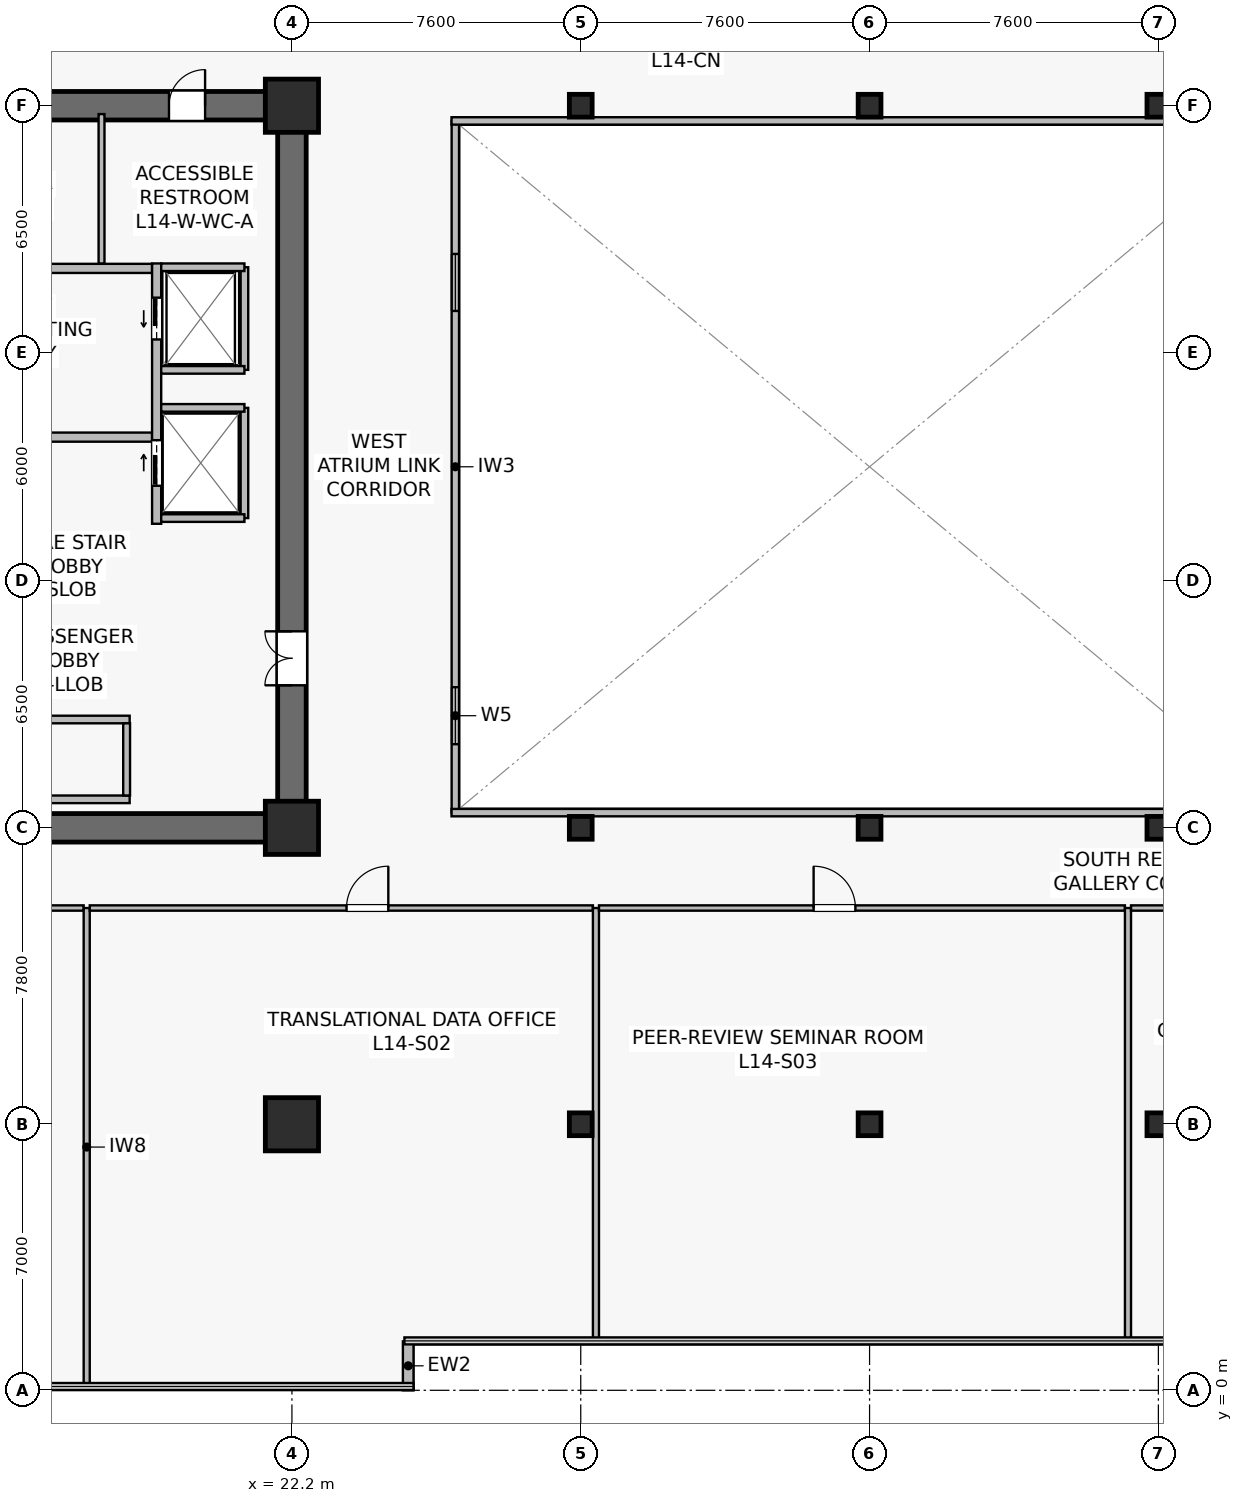
"""IFC4 building model, lengths in metres.
Left out: names, types, materials, properties, quantities, classifications, styles, units other than length and angle.
Written with IfcOpenShell. Run it as: python <this file> out.ifc"""

import sys

from ifc_helpers import new_model, si_unit, direction, frame, frame_2d, origin, origin_2d, place, context, subcontext, project, spatial, rectangle, hollow_rectangle, extrude, source, transform, mapped, element, fill, save


model = new_model("IFC4")
c1 = context("Model", 3, precision=1e-05, world=origin(), true_north=direction((0.0, 1.0)))
c2 = subcontext(c1, "Body", "Model", "MODEL_VIEW")
j1 = project(units=[si_unit("LENGTHUNIT", "METRE"), si_unit("PLANEANGLEUNIT", "RADIAN")], contexts=[c1])
p1 = place(None, origin())
s1 = spatial("IfcSite", under=j1, at=p1, CompositionType="ELEMENT")
p2 = place(p1, origin())
s2 = spatial("IfcBuilding", under=s1, at=p2, CompositionType="ELEMENT")
p3 = place(p2, frame((0.0, 0.0, 58.0)))
s3 = spatial("IfcBuildingStorey", under=s2, at=p3, CompositionType="ELEMENT", Elevation=58.0)
p4 = place(p3, frame((7.025, 14.8, 0.0), z_axis=(0.0, 0.0, 1.0), x_axis=(1.0, 0.0, 0.0)))
e1 = element("IfcWall", 1, at=p4, inside=s3, PredefinedType="SHEAR", context=c2, shape_type="SweptSolid", body=[
    extrude(rectangle(XDim=15.55, YDim=0.75, at=frame_2d((7.775, 0.0))), origin(), (0.0, 0.0, 1.0), 3.78),
])
p5 = place(p3, frame((7.025, 33.8, 0.0), z_axis=(0.0, 0.0, 1.0), x_axis=(1.0, 0.0, 0.0)))
e2 = element("IfcWall", 2, at=p5, inside=s3, PredefinedType="SHEAR", context=c2, shape_type="SweptSolid", body=[
    extrude(rectangle(XDim=15.55, YDim=0.75, at=frame_2d((7.775, 0.0))), origin(), (0.0, 0.0, 1.0), 3.78),
])
p6 = place(p5, frame((6.875, 0.0, 0.0)))
e3 = element("IfcOpeningElement", 3, at=p6, cuts=e2, PredefinedType="OPENING", context=c2, shape_type="SweptSolid", body=[
    extrude(rectangle(XDim=0.95, YDim=2.15, at=frame_2d((0.475, 1.075))), frame((0.0, 0.385, 0.0), z_axis=(0.0, -1.0, 0.0), x_axis=(1.0, 0.0, 0.0)), (0.0, 0.0, 1.0), 0.77),
])
p7 = place(p5, frame((11.94, 0.0, 0.0)))
e4 = element("IfcOpeningElement", 4, at=p7, cuts=e2, PredefinedType="OPENING", context=c2, shape_type="SweptSolid", body=[
    extrude(rectangle(XDim=0.95, YDim=2.15, at=frame_2d((0.475, 1.075))), frame((0.0, 0.385, 0.0), z_axis=(0.0, -1.0, 0.0), x_axis=(1.0, 0.0, 0.0)), (0.0, 0.0, 1.0), 0.77),
])
p8 = place(p3, frame((22.2, 15.175, 0.0), z_axis=(0.0, 0.0, 1.0), x_axis=(0.0, 1.0, 0.0)))
e5 = element("IfcWall", 5, at=p8, inside=s3, PredefinedType="SHEAR", context=c2, shape_type="SweptSolid", body=[
    extrude(rectangle(XDim=18.25, YDim=0.75, at=frame_2d((9.125, 0.0))), origin(), (0.0, 0.0, 1.0), 3.78),
])
p9 = place(p8, frame((3.375, 0.0, 0.0)))
e6 = element("IfcOpeningElement", 6, at=p9, cuts=e5, PredefinedType="OPENING", context=c2, shape_type="SweptSolid", body=[
    extrude(rectangle(XDim=1.42, YDim=2.2, at=frame_2d((0.71, 1.1))), frame((0.0, 0.385, 0.0), z_axis=(0.0, -1.0, 0.0), x_axis=(1.0, 0.0, 0.0)), (0.0, 0.0, 1.0), 0.77),
])
m1 = source(origin(), c2, "Body", "SweptSolid", [
    extrude(rectangle(XDim=1.4, YDim=1.4, at=origin_2d()), origin(), (0.0, 0.0, 1.0), 4.1),
])
for number, where, z_axis, x_axis in (
    (7, (22.2, 7.0, 0.0), (0.0, 0.0, 1.0), (1.0, 0.0, 0.0)),
    (8, (22.2, 14.8, 0.0), (0.0, 0.0, 1.0), (1.0, 0.0, 0.0)),
    (9, (22.2, 33.8, 0.0), (0.0, 0.0, 1.0), (1.0, 0.0, 0.0)),
):
    element("IfcColumn", number, at=place(p3, frame(where, z_axis=z_axis, x_axis=x_axis)), inside=s3, PredefinedType="COLUMN", context=c2, shape_type="MappedRepresentation", body=[
        mapped(m1, transform((0.0, 0.0, 0.0), scale=1.0)),
    ])
m2 = source(origin(), c2, "Body", "SweptSolid", [
    extrude(hollow_rectangle(XDim=0.6, YDim=0.6, WallThickness=0.028, at=origin_2d()), origin(), (0.0, 0.0, 1.0), 4.1),
])
for number, where, z_axis, x_axis in (
    (10, (29.8, 7.0, 0.0), (0.0, 0.0, 1.0), (1.0, 0.0, 0.0)),
    (11, (29.8, 14.8, 0.0), (0.0, 0.0, 1.0), (1.0, 0.0, 0.0)),
    (12, (29.8, 33.8, 0.0), (0.0, 0.0, 1.0), (1.0, 0.0, 0.0)),
    (13, (37.4, 7.0, 0.0), (0.0, 0.0, 1.0), (1.0, 0.0, 0.0)),
    (14, (37.4, 14.8, 0.0), (0.0, 0.0, 1.0), (1.0, 0.0, 0.0)),
    (15, (37.4, 33.8, 0.0), (0.0, 0.0, 1.0), (1.0, 0.0, 0.0)),
    (16, (45.0, 7.0, 0.0), (0.0, 0.0, 1.0), (1.0, 0.0, 0.0)),
    (17, (45.0, 14.8, 0.0), (0.0, 0.0, 1.0), (1.0, 0.0, 0.0)),
    (18, (45.0, 33.8, 0.0), (0.0, 0.0, 1.0), (1.0, 0.0, 0.0)),
):
    element("IfcColumn", number, at=place(p3, frame(where, z_axis=z_axis, x_axis=x_axis)), inside=s3, PredefinedType="COLUMN", context=c2, shape_type="MappedRepresentation", body=[
        mapped(m2, transform((0.0, 0.0, 0.0), scale=1.0)),
    ])
p10 = place(p3, frame((25.26, 0.0, 0.0), z_axis=(0.0, 0.0, 1.0), x_axis=(0.0, 1.0, 0.0)))
e19 = element("IfcWall", 19, at=p10, inside=s3, PredefinedType="STANDARD", context=c2, shape_type="SweptSolid", body=[
    extrude(rectangle(XDim=1.288, YDim=0.28, at=frame_2d((0.644, 0.0))), origin(), (0.0, 0.0, 1.0), 3.78),
])
p11 = place(p3, frame((11.6, 25.08, 0.0), z_axis=(0.0, 0.0, 1.0), x_axis=(1.0, 0.0, 0.0)))
e20 = element("IfcWall", 20, at=p11, inside=s3, PredefinedType="SOLIDWALL", context=c2, shape_type="SweptSolid", body=[
    extrude(rectangle(XDim=6.92, YDim=0.24, at=frame_2d((3.46, 0.0))), origin(), (0.0, 0.0, 1.0), 3.065),
])
p12 = place(p11, frame((2.6, 0.0, 0.0)))
e21 = element("IfcOpeningElement", 21, at=p12, cuts=e20, PredefinedType="OPENING", context=c2, shape_type="SweptSolid", body=[
    extrude(rectangle(XDim=1.2, YDim=2.16, at=frame_2d((0.6, 1.08))), frame((0.0, 0.13, 0.0), z_axis=(0.0, -1.0, 0.0), x_axis=(1.0, 0.0, 0.0)), (0.0, 0.0, 1.0), 0.26),
])
p13 = place(p3, frame((11.6, 29.52, 0.0), z_axis=(0.0, 0.0, 1.0), x_axis=(1.0, 0.0, 0.0)))
e22 = element("IfcWall", 22, at=p13, inside=s3, PredefinedType="SOLIDWALL", context=c2, shape_type="SweptSolid", body=[
    extrude(rectangle(XDim=6.92, YDim=0.24, at=frame_2d((3.46, 0.0))), origin(), (0.0, 0.0, 1.0), 3.065),
])
p14 = place(p3, frame((18.64, 22.8, 0.0), z_axis=(0.0, 0.0, 1.0), x_axis=(0.0, 1.0, 0.0)))
e23 = element("IfcWall", 23, at=p14, inside=s3, PredefinedType="SOLIDWALL", context=c2, shape_type="SweptSolid", body=[
    extrude(rectangle(XDim=6.85, YDim=0.24, at=frame_2d((3.425, 0.0))), origin(), (0.0, 0.0, 1.0), 2.865),
])
p15 = place(p14, frame((4.85, 0.0, 0.0)))
e24 = element("IfcOpeningElement", 24, at=p15, cuts=e23, PredefinedType="OPENING", context=c2, shape_type="SweptSolid", body=[
    extrude(rectangle(XDim=1.1, YDim=2.22, at=frame_2d((0.55, 1.11))), frame((0.0, 0.13, 0.0), z_axis=(0.0, -1.0, 0.0), x_axis=(1.0, 0.0, 0.0)), (0.0, 0.0, 1.0), 0.26),
])
p16 = place(p14, frame((1.0, 0.0, 0.0)))
e25 = element("IfcOpeningElement", 25, at=p16, cuts=e23, PredefinedType="OPENING", context=c2, shape_type="SweptSolid", body=[
    extrude(rectangle(XDim=1.2, YDim=2.22, at=frame_2d((0.6, 1.11))), frame((0.0, 0.13, 0.0), z_axis=(0.0, -1.0, 0.0), x_axis=(1.0, 0.0, 0.0)), (0.0, 0.0, 1.0), 0.26),
])
for number, where, z_axis, x_axis in (
    (26, (15.67, 17.65, 0.0), (0.0, 0.0, 1.0), (1.0, 0.0, 0.0)),
    (27, (15.67, 15.55, 0.0), (0.0, 0.0, 1.0), (1.0, 0.0, 0.0)),
):
    element("IfcWall", number, at=place(p3, frame(where, z_axis=z_axis, x_axis=x_axis)), inside=s3, PredefinedType="SOLIDWALL", context=c2, shape_type="SweptSolid", body=[
        extrude(rectangle(XDim=2.26, YDim=0.2, at=frame_2d((1.13, 0.0))), origin(), (0.0, 0.0, 1.0), 3.78),
    ])
p17 = place(p3, frame((17.85, 15.65, 0.0), z_axis=(0.0, 0.0, 1.0), x_axis=(0.0, 1.0, 0.0)))
e28 = element("IfcWall", 28, at=p17, inside=s3, PredefinedType="SOLIDWALL", context=c2, shape_type="SweptSolid", body=[
    extrude(rectangle(XDim=1.9, YDim=0.18, at=frame_2d((0.95, 0.0))), origin(), (0.0, 0.0, 1.0), 3.78),
])
p18 = place(p3, frame((20.95, 26.85, 0.0), z_axis=(0.0, 0.0, 1.0), x_axis=(0.0, 1.0, 0.0)))
e29 = element("IfcWall", 29, at=p18, inside=s3, PredefinedType="SOLIDWALL", context=c2, shape_type="SweptSolid", body=[
    extrude(rectangle(XDim=2.7, YDim=0.2, at=frame_2d((1.35, 0.0))), origin(), (0.0, 0.0, 1.0), 3.78),
])
p19 = place(p3, frame((18.76, 29.55, 0.0), z_axis=(0.0, 0.0, 1.0), x_axis=(1.0, 0.0, 0.0)))
e30 = element("IfcWall", 30, at=p19, inside=s3, PredefinedType="SOLIDWALL", context=c2, shape_type="SweptSolid", body=[
    extrude(rectangle(XDim=2.19, YDim=0.2, at=frame_2d((1.095, 0.0))), origin(), (0.0, 0.0, 1.0), 3.78),
])
p20 = place(p3, frame((18.76, 26.85, 0.0), z_axis=(0.0, 0.0, 1.0), x_axis=(1.0, 0.0, 0.0)))
e31 = element("IfcWall", 31, at=p20, inside=s3, PredefinedType="SOLIDWALL", context=c2, shape_type="SweptSolid", body=[
    extrude(rectangle(XDim=2.19, YDim=0.2, at=frame_2d((1.095, 0.0))), origin(), (0.0, 0.0, 1.0), 3.177),
])
p21 = place(p3, frame((20.95, 22.95, 0.0), z_axis=(0.0, 0.0, 1.0), x_axis=(0.0, 1.0, 0.0)))
e32 = element("IfcWall", 32, at=p21, inside=s3, PredefinedType="SOLIDWALL", context=c2, shape_type="SweptSolid", body=[
    extrude(rectangle(XDim=2.9, YDim=0.2, at=frame_2d((1.45, 0.0))), origin(), (0.0, 0.0, 1.0), 2.865),
])
for number, where, z_axis, x_axis in (
    (33, (18.76, 25.85, 0.0), (0.0, 0.0, 1.0), (1.0, 0.0, 0.0)),
    (34, (18.76, 22.95, 0.0), (0.0, 0.0, 1.0), (1.0, 0.0, 0.0)),
):
    element("IfcWall", number, at=place(p3, frame(where, z_axis=z_axis, x_axis=x_axis)), inside=s3, PredefinedType="SOLIDWALL", context=c2, shape_type="SweptSolid", body=[
        extrude(rectangle(XDim=2.19, YDim=0.2, at=frame_2d((1.095, 0.0))), origin(), (0.0, 0.0, 1.0), 3.78),
    ])
p22 = place(p3, frame((17.19, 29.65, 0.0), z_axis=(0.0, 0.0, 1.0), x_axis=(0.0, 1.0, 0.0)))
e35 = element("IfcWall", 35, at=p22, inside=s3, PredefinedType="PLUMBINGWALL", context=c2, shape_type="SweptSolid", body=[
    extrude(rectangle(XDim=3.93, YDim=0.155, at=frame_2d((1.965, 0.0))), origin(), (0.0, 0.0, 1.0), 3.78),
])
p23 = place(p3, frame((26.5, 15.2, 0.0), z_axis=(0.0, 0.0, 1.0), x_axis=(0.0, 1.0, 0.0)))
e36 = element("IfcWall", 36, at=p23, inside=s3, PredefinedType="SOLIDWALL", context=c2, shape_type="SweptSolid", body=[
    extrude(rectangle(XDim=18.2, YDim=0.195, at=frame_2d((9.1, 0.0))), origin(), (0.0, 0.0, 1.0), 3.78),
])
p24 = place(p23, frame((1.8, 0.0, 0.9)))
e37 = element("IfcOpeningElement", 37, at=p24, cuts=e36, PredefinedType="OPENING", context=c2, shape_type="SweptSolid", body=[
    extrude(rectangle(XDim=1.5, YDim=1.4, at=frame_2d((0.75, 0.7))), frame((0.0, 0.107, 0.0), z_axis=(0.0, -1.0, 0.0), x_axis=(1.0, 0.0, 0.0)), (0.0, 0.0, 1.0), 0.215),
])
p25 = place(p23, frame((13.2, 0.0, 0.9)))
e38 = element("IfcOpeningElement", 38, at=p25, cuts=e36, PredefinedType="OPENING", context=c2, shape_type="SweptSolid", body=[
    extrude(rectangle(XDim=1.5, YDim=1.4, at=frame_2d((0.75, 0.7))), frame((0.0, 0.107, 0.0), z_axis=(0.0, -1.0, 0.0), x_axis=(1.0, 0.0, 0.0)), (0.0, 0.0, 1.0), 0.215),
])
for number, where, z_axis, x_axis in (
    (39, (26.4, 15.2, 0.0), (0.0, 0.0, 1.0), (1.0, 0.0, 0.0)),
    (40, (26.4, 33.4, 0.0), (0.0, 0.0, 1.0), (1.0, 0.0, 0.0)),
):
    element("IfcWall", number, at=place(p3, frame(where, z_axis=z_axis, x_axis=x_axis)), inside=s3, PredefinedType="SOLIDWALL", context=c2, shape_type="SweptSolid", body=[
        extrude(rectangle(XDim=22.0, YDim=0.195, at=frame_2d((11.0, 0.0))), origin(), (0.0, 0.0, 1.0), 3.78),
    ])
p26 = place(p3, frame((6.98, 12.69, 0.0), z_axis=(0.0, 0.0, 1.0), x_axis=(1.0, 0.0, 0.0)))
e41 = element("IfcWall", 41, at=p26, inside=s3, PredefinedType="PARTITIONING", context=c2, shape_type="SweptSolid", body=[
    extrude(rectangle(XDim=9.74, YDim=0.14, at=frame_2d((4.87, 0.0))), origin(), (0.0, 0.0, 1.0), 3.065),
])
p27 = place(p26, frame((3.844, 0.0, 0.0)))
e42 = element("IfcOpeningElement", 42, at=p27, cuts=e41, PredefinedType="OPENING", context=c2, shape_type="SweptSolid", body=[
    extrude(rectangle(XDim=1.1, YDim=2.18, at=frame_2d((0.55, 1.09))), frame((0.0, 0.08, 0.0), z_axis=(0.0, -1.0, 0.0), x_axis=(1.0, 0.0, 0.0)), (0.0, 0.0, 1.0), 0.16),
])
p28 = place(p3, frame((16.8, 0.11, 0.0), z_axis=(0.0, 0.0, 1.0), x_axis=(0.0, 1.0, 0.0)))
e43 = element("IfcWall", 43, at=p28, inside=s3, PredefinedType="PARTITIONING", context=c2, shape_type="SweptSolid", body=[
    extrude(rectangle(XDim=12.58, YDim=0.16, at=frame_2d((6.29, 0.0))), origin(), (0.0, 0.0, 1.0), 3.015),
])
p29 = place(p3, frame((16.88, 12.69, 0.0), z_axis=(0.0, 0.0, 1.0), x_axis=(1.0, 0.0, 0.0)))
e44 = element("IfcWall", 44, at=p29, inside=s3, PredefinedType="PARTITIONING", context=c2, shape_type="SweptSolid", body=[
    extrude(rectangle(XDim=13.24, YDim=0.14, at=frame_2d((6.62, 0.0))), origin(), (0.0, 0.0, 1.0), 3.065),
])
p30 = place(p29, frame((6.756, 0.0, 0.0)))
e45 = element("IfcOpeningElement", 45, at=p30, cuts=e44, PredefinedType="OPENING", context=c2, shape_type="SweptSolid", body=[
    extrude(rectangle(XDim=1.1, YDim=2.18, at=frame_2d((0.55, 1.09))), frame((0.0, 0.08, 0.0), z_axis=(0.0, -1.0, 0.0), x_axis=(1.0, 0.0, 0.0)), (0.0, 0.0, 1.0), 0.16),
])
p31 = place(p3, frame((30.2, 1.31, 0.0), z_axis=(0.0, 0.0, 1.0), x_axis=(0.0, 1.0, 0.0)))
e46 = element("IfcWall", 46, at=p31, inside=s3, PredefinedType="PARTITIONING", context=c2, shape_type="SweptSolid", body=[
    extrude(rectangle(XDim=11.38, YDim=0.16, at=frame_2d((5.69, 0.0))), origin(), (0.0, 0.0, 1.0), 3.015),
])
p32 = place(p3, frame((30.28, 12.69, 0.0), z_axis=(0.0, 0.0, 1.0), x_axis=(1.0, 0.0, 0.0)))
e47 = element("IfcWall", 47, at=p32, inside=s3, PredefinedType="PARTITIONING", context=c2, shape_type="SweptSolid", body=[
    extrude(rectangle(XDim=13.84, YDim=0.14, at=frame_2d((6.92, 0.0))), origin(), (0.0, 0.0, 1.0), 3.065),
])
p33 = place(p32, frame((5.648, 0.0, 0.0)))
e48 = element("IfcOpeningElement", 48, at=p33, cuts=e47, PredefinedType="OPENING", context=c2, shape_type="SweptSolid", body=[
    extrude(rectangle(XDim=1.1, YDim=2.18, at=frame_2d((0.55, 1.09))), frame((0.0, 0.08, 0.0), z_axis=(0.0, -1.0, 0.0), x_axis=(1.0, 0.0, 0.0)), (0.0, 0.0, 1.0), 0.16),
])
p34 = place(p3, frame((44.2, 1.31, 0.0), z_axis=(0.0, 0.0, 1.0), x_axis=(0.0, 1.0, 0.0)))
e49 = element("IfcWall", 49, at=p34, inside=s3, PredefinedType="PARTITIONING", context=c2, shape_type="SweptSolid", body=[
    extrude(rectangle(XDim=11.38, YDim=0.16, at=frame_2d((5.69, 0.0))), origin(), (0.0, 0.0, 1.0), 3.015),
])
p35 = place(p3, frame((44.28, 12.69, 0.0), z_axis=(0.0, 0.0, 1.0), x_axis=(1.0, 0.0, 0.0)))
e50 = element("IfcWall", 50, at=p35, inside=s3, PredefinedType="PARTITIONING", context=c2, shape_type="SweptSolid", body=[
    extrude(rectangle(XDim=14.64, YDim=0.14, at=frame_2d((7.32, 0.0))), origin(), (0.0, 0.0, 1.0), 3.065),
])
p36 = place(p35, frame((4.844, 0.0, 0.0)))
e51 = element("IfcOpeningElement", 51, at=p36, cuts=e50, PredefinedType="OPENING", context=c2, shape_type="SweptSolid", body=[
    extrude(rectangle(XDim=1.1, YDim=2.18, at=frame_2d((0.55, 1.09))), frame((0.0, 0.08, 0.0), z_axis=(0.0, -1.0, 0.0), x_axis=(1.0, 0.0, 0.0)), (0.0, 0.0, 1.0), 0.16),
])
m3 = source(origin(), c2, "Body", "SweptSolid", [
    extrude(rectangle(XDim=1.5, YDim=1.4, at=frame_2d((0.75, 0.7))), frame((0.0, 0.03, 0.0), z_axis=(0.0, -1.0, 0.0), x_axis=(1.0, 0.0, 0.0)), (0.0, 0.0, 1.0), 0.06),
])
p37 = place(p24, origin())
e52 = element("IfcWindow", 52, at=p37, inside=s3, PartitioningType="SINGLE_PANEL", PredefinedType="WINDOW", context=c2, shape_type="MappedRepresentation", body=[
    mapped(m3, transform((0.0, 0.0, 0.0), scale=1.0)),
])
fill(e37, e52)
p38 = place(p25, origin())
e53 = element("IfcWindow", 53, at=p38, inside=s3, PartitioningType="SINGLE_PANEL", PredefinedType="WINDOW", context=c2, shape_type="MappedRepresentation", body=[
    mapped(m3, transform((0.0, 0.0, 0.0), scale=1.0)),
])
fill(e38, e53)
m4 = source(origin(), c2, "Body", "SweptSolid", [
    extrude(rectangle(XDim=1.1, YDim=2.22, at=frame_2d((0.55, 1.11))), frame((0.0, 0.025, 0.0), z_axis=(0.0, -1.0, 0.0), x_axis=(1.0, 0.0, 0.0)), (0.0, 0.0, 1.0), 0.05),
])
p39 = place(p15, origin())
e54 = element("IfcDoor", 54, at=p39, inside=s3, OperationType="SLIDING_TO_LEFT", PredefinedType="USERDEFINED", context=c2, shape_type="MappedRepresentation", body=[
    mapped(m4, transform((0.0, 0.0, 0.0), scale=1.0)),
])
fill(e24, e54)
m5 = source(origin(), c2, "Body", "SweptSolid", [
    extrude(rectangle(XDim=1.2, YDim=2.22, at=frame_2d((0.6, 1.11))), frame((0.0, 0.025, 0.0), z_axis=(0.0, -1.0, 0.0), x_axis=(1.0, 0.0, 0.0)), (0.0, 0.0, 1.0), 0.05),
])
p40 = place(p16, origin())
e55 = element("IfcDoor", 55, at=p40, inside=s3, OperationType="SLIDING_TO_RIGHT", PredefinedType="USERDEFINED", context=c2, shape_type="MappedRepresentation", body=[
    mapped(m5, transform((0.0, 0.0, 0.0), scale=1.0)),
])
fill(e25, e55)
m6 = source(origin(), c2, "Body", "SweptSolid", [
    extrude(rectangle(XDim=1.42, YDim=2.2, at=frame_2d((0.71, 1.1))), frame((0.0, 0.025, 0.0), z_axis=(0.0, -1.0, 0.0), x_axis=(1.0, 0.0, 0.0)), (0.0, 0.0, 1.0), 0.05),
])
p41 = place(p9, origin())
e56 = element("IfcDoor", 56, at=p41, inside=s3, OperationType="DOUBLE_DOOR_SINGLE_SWING", PredefinedType="DOOR", context=c2, shape_type="MappedRepresentation", body=[
    mapped(m6, transform((0.0, 0.0, 0.0), scale=1.0)),
])
fill(e6, e56)
m7 = source(origin(), c2, "Body", "SweptSolid", [
    extrude(rectangle(XDim=0.95, YDim=2.15, at=frame_2d((0.475, 1.075))), frame((0.0, 0.025, 0.0), z_axis=(0.0, -1.0, 0.0), x_axis=(1.0, 0.0, 0.0)), (0.0, 0.0, 1.0), 0.05),
])
p42 = place(p7, origin())
e57 = element("IfcDoor", 57, at=p42, inside=s3, OperationType="SINGLE_SWING_RIGHT", PredefinedType="DOOR", context=c2, shape_type="MappedRepresentation", body=[
    mapped(m7, transform((0.0, 0.0, 0.0), scale=1.0)),
])
fill(e4, e57)
m8 = source(origin(), c2, "Body", "SweptSolid", [
    extrude(rectangle(XDim=1.1, YDim=2.18, at=frame_2d((0.55, 1.09))), frame((0.0, 0.025, 0.0), z_axis=(0.0, -1.0, 0.0), x_axis=(1.0, 0.0, 0.0)), (0.0, 0.0, 1.0), 0.05),
])
p43 = place(p30, origin())
e58 = element("IfcDoor", 58, at=p43, inside=s3, OperationType="SINGLE_SWING_RIGHT", PredefinedType="DOOR", context=c2, shape_type="MappedRepresentation", body=[
    mapped(m8, transform((0.0, 0.0, 0.0), scale=1.0)),
])
fill(e45, e58)
p44 = place(p33, origin())
e59 = element("IfcDoor", 59, at=p44, inside=s3, OperationType="SINGLE_SWING_LEFT", PredefinedType="DOOR", context=c2, shape_type="MappedRepresentation", body=[
    mapped(m8, transform((0.0, 0.0, 0.0), scale=1.0)),
])
fill(e48, e59)
save(model, sys.argv[1])
